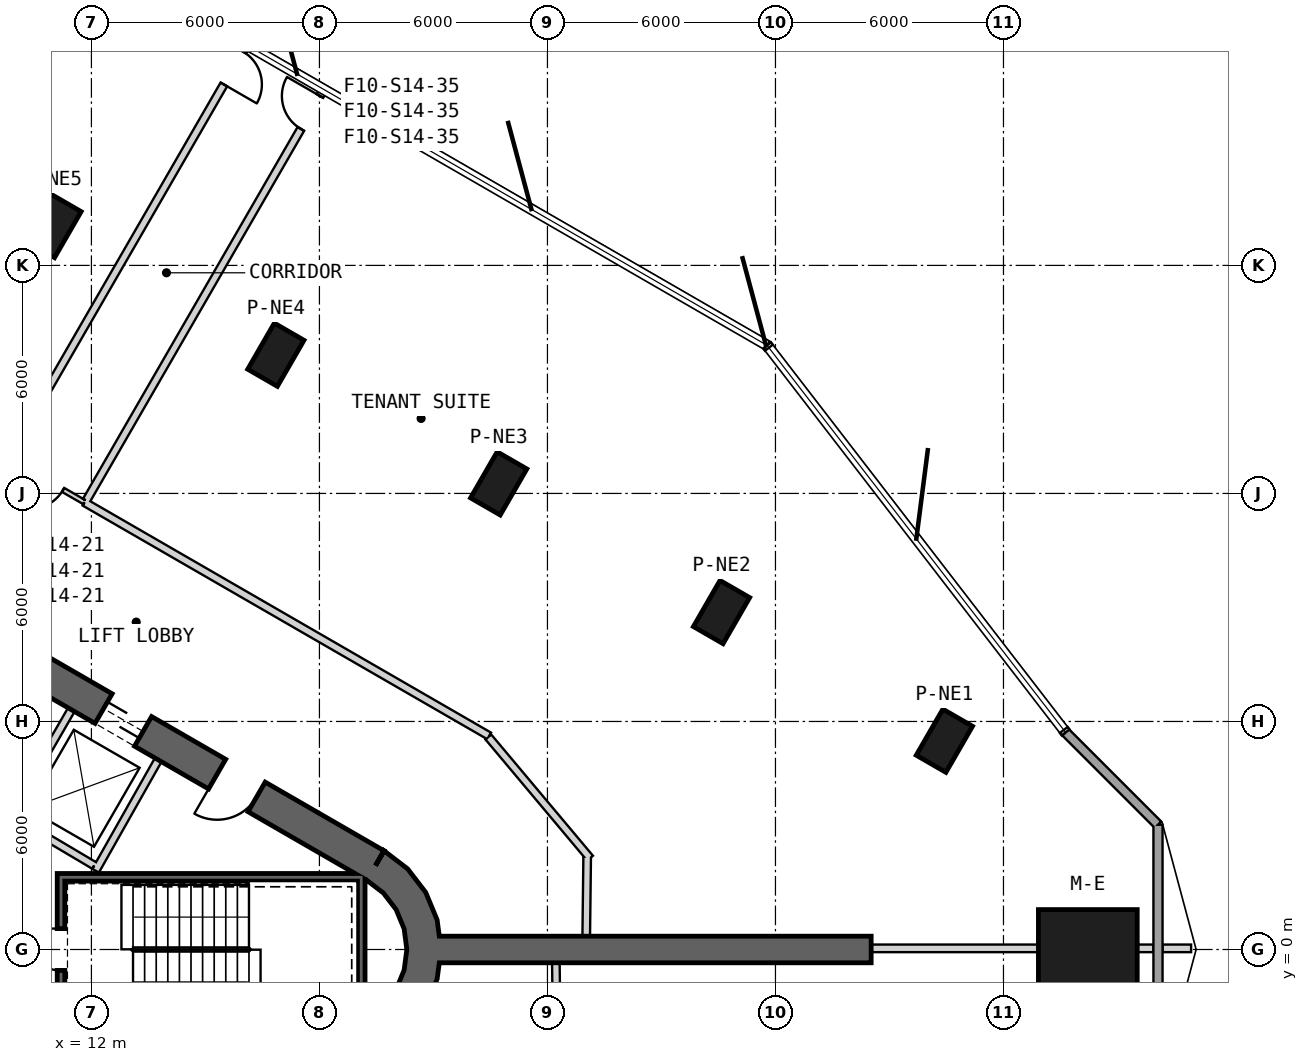
"""IFC4 building model, lengths in metres.
Left out: names, types, materials, properties, quantities, classifications, styles, units other than length and angle.
Written with IfcOpenShell. Run it as: python <this file> out.ifc"""

import sys

from ifc_helpers import new_model, si_unit, direction, frame, frame_2d, origin, origin_2d, place, context, subcontext, project, spatial, polyline, rectangle, outline, extrude, element, fill, save


model = new_model("IFC4")
c1 = context("Model", 3, precision=1e-05, world=origin(), true_north=direction((0.0, 1.0)))
c2 = subcontext(c1, "Body", "Model", "MODEL_VIEW")
j1 = project(units=[si_unit("LENGTHUNIT", "METRE"), si_unit("PLANEANGLEUNIT", "RADIAN")], contexts=[c1])
p1 = place(None, origin())
s1 = spatial("IfcSite", under=j1, at=p1, CompositionType="ELEMENT")
p2 = place(p1, origin())
s2 = spatial("IfcBuilding", under=s1, at=p2, CompositionType="ELEMENT")
p3 = place(p2, frame((0.0, 0.0, 229.2)))
s3 = spatial("IfcBuildingStorey", under=s2, at=p3, CompositionType="ELEMENT", Elevation=229.2)
p4 = place(p3, frame((38.219, 0.0, 0.0), z_axis=(0.0, 0.0, 1.0), x_axis=(1.0, 0.0, 0.0)))
e1 = element("IfcColumn", 1, at=p4, inside=s3, PredefinedType="COLUMN", context=c2, shape_type="SweptSolid", body=[
    extrude(rectangle(XDim=2.6, YDim=2.1, at=origin_2d()), origin(), (0.0, 0.0, 1.0), 4.0),
])
for number, where, z_axis, x_axis in (
    (2, (34.445, 5.493, 0.0), (0.0, 0.0, 1.0), (0.5, 0.866, 0.0)),
    (3, (28.581, 8.878, 0.0), (0.0, 0.0, 1.0), (0.5, 0.866, 0.0)),
    (4, (22.717, 12.264, 0.0), (0.0, 0.0, 1.0), (0.5, 0.866, 0.0)),
    (5, (16.854, 15.649, 0.0), (0.0, 0.0, 1.0), (0.5, 0.866, 0.0)),
    (6, (10.99, 19.035, 0.0), (0.0, 0.0, 1.0), (0.5, 0.866, 0.0)),
):
    element("IfcColumn", number, at=place(p3, frame(where, z_axis=z_axis, x_axis=x_axis)), inside=s3, PredefinedType="COLUMN", context=c2, shape_type="SweptSolid", body=[
        extrude(rectangle(XDim=1.4, YDim=0.9, at=origin_2d()), origin(), (0.0, 0.0, 1.0), 4.0),
    ])
p5 = place(p3, frame((19.475, 2.208, 0.0), z_axis=(0.0, 0.0, 1.0), x_axis=(-0.866028369851, 0.499994862586, 0.0)))
e7 = element("IfcWall", 7, at=p5, inside=s3, PredefinedType="SHEAR", context=c2, shape_type="SweptSolid", body=[
    extrude(rectangle(XDim=31.523, YDim=0.9, at=frame_2d((15.762, 0.0))), origin(), (0.0, 0.0, 1.0), 4.0),
])
p6 = place(p5, frame((7.062, 0.0, 0.0)))
e8 = element("IfcOpeningElement", 8, at=p6, cuts=e7, PredefinedType="OPENING", context=c2, shape_type="SweptSolid", body=[
    extrude(rectangle(XDim=1.2, YDim=2.4, at=frame_2d((0.6, 1.2))), frame((0.0, 0.46, 0.0), z_axis=(0.0, -1.0, 0.0), x_axis=(1.0, 0.0, 0.0)), (0.0, 0.0, 1.0), 0.92),
])
p7 = place(p5, frame((3.612, 0.0, 0.0)))
e9 = element("IfcOpeningElement", 9, at=p7, cuts=e7, PredefinedType="OPENING", context=c2, shape_type="SweptSolid", body=[
    extrude(rectangle(XDim=1.2, YDim=2.4, at=frame_2d((0.6, 1.2))), frame((0.0, 0.46, 0.0), z_axis=(0.0, -1.0, 0.0), x_axis=(1.0, 0.0, 0.0)), (0.0, 0.0, 1.0), 0.92),
])
p8 = place(p5, frame((26.712, 0.0, 0.0)))
e10 = element("IfcOpeningElement", 10, at=p8, cuts=e7, PredefinedType="OPENING", context=c2, shape_type="SweptSolid", body=[
    extrude(rectangle(XDim=1.2, YDim=2.4, at=frame_2d((0.6, 1.2))), frame((0.0, 0.46, 0.0), z_axis=(0.0, -1.0, 0.0), x_axis=(1.0, 0.0, 0.0)), (0.0, 0.0, 1.0), 0.92),
])
p9 = place(p3, origin())
e11 = element("IfcWall", 11, at=p9, inside=s3, PredefinedType="SHEAR", context=c2, shape_type="SweptSolid", body=[
    extrude(outline(polyline([(19.7, -2.598), (20.321, -2.121), (20.798, -1.5), (21.098, -0.777), (21.2, 0.0), (21.098, 0.777), (20.798, 1.5), (20.321, 2.121), (19.7, 2.598), (19.25, 1.819), (19.685, 1.485), (20.019, 1.05), (20.229, 0.543), (20.3, 0.0), (20.229, -0.543), (20.019, -1.05), (19.685, -1.485), (19.25, -1.819), (19.7, -2.598)])), origin(), (0.0, 0.0, 1.0), 4.0),
])
p10 = place(p3, frame((21.15, 0.0, 0.0), z_axis=(0.0, 0.0, 1.0), x_axis=(1.0, 0.0, 0.0)))
e12 = element("IfcWall", 12, at=p10, inside=s3, PredefinedType="SHEAR", context=c2, shape_type="SweptSolid", body=[
    extrude(rectangle(XDim=11.368, YDim=0.7, at=frame_2d((5.684, 0.0))), origin(), (0.0, 0.0, 1.0), 4.0),
])
p11 = place(p3, frame((40.066, -3.282, 0.0), z_axis=(0.0, 0.0, 1.0), x_axis=(0.0, 1.0, 0.0)))
e13 = element("IfcWall", 13, at=p11, inside=s3, PredefinedType="SOLIDWALL", context=c2, shape_type="SweptSolid", body=[
    extrude(rectangle(XDim=6.564, YDim=0.24, at=frame_2d((3.282, 0.0))), origin(), (0.0, 0.0, 1.0), 3.7),
])
p12 = place(p3, frame((40.066, 3.282, 0.0), z_axis=(0.0, 0.0, 1.0), x_axis=(-0.707106781187, 0.707106781187, 0.0)))
e14 = element("IfcWall", 14, at=p12, inside=s3, PredefinedType="SOLIDWALL", context=c2, shape_type="SweptSolid", body=[
    extrude(rectangle(XDim=3.438, YDim=0.24, at=frame_2d((1.719, 0.0))), origin(), (0.0, 0.0, 1.0), 3.7),
])
p13 = place(p3, frame((9.847, 3.495, 0.0), z_axis=(0.0, 0.0, 1.0), x_axis=(0.499984717929, 0.866034226713, 0.0)))
e15 = element("IfcWall", 15, at=p13, inside=s3, PredefinedType="PLUMBINGWALL", context=c2, shape_type="SweptSolid", body=[
    extrude(rectangle(XDim=3.25, YDim=0.2, at=frame_2d((1.625, 0.0))), origin(), (0.0, 0.0, 1.0), 3.7),
])
p14 = place(p3, frame((12.11, 2.073, 0.0), z_axis=(0.0, 0.0, 1.0), x_axis=(0.49196600604, 0.870614408852, 0.0)))
e16 = element("IfcWall", 16, at=p14, inside=s3, PredefinedType="PLUMBINGWALL", context=c2, shape_type="SweptSolid", body=[
    extrude(rectangle(XDim=3.35, YDim=0.2, at=frame_2d((1.675, 0.0))), origin(), (0.0, 0.0, 1.0), 3.7),
])
p15 = place(p3, frame((12.073, 2.211, 0.0), z_axis=(0.0, 0.0, 1.0), x_axis=(-0.860414880418, 0.509594185166, 0.0)))
e17 = element("IfcWall", 17, at=p15, inside=s3, PredefinedType="PLUMBINGWALL", context=c2, shape_type="SweptSolid", body=[
    extrude(rectangle(XDim=2.7, YDim=0.2, at=frame_2d((1.35, 0.0))), origin(), (0.0, 0.0, 1.0), 3.7),
])
p16 = place(p3, frame((19.2, 1.9, -0.3), z_axis=(0.0, 0.0, 1.0), x_axis=(-1.0, 0.0, 0.0)))
e18 = element("IfcWall", 18, at=p16, inside=s3, PredefinedType="SHEAR", context=c2, shape_type="SweptSolid", body=[
    extrude(rectangle(XDim=8.1, YDim=0.2, at=frame_2d((4.05, 0.0))), origin(), (0.0, 0.0, 1.0), 4.0),
])
p17 = place(p3, frame((19.1, -2.0, -0.3), z_axis=(0.0, 0.0, 1.0), x_axis=(0.0, 1.0, 0.0)))
e19 = element("IfcWall", 19, at=p17, inside=s3, PredefinedType="SHEAR", context=c2, shape_type="SweptSolid", body=[
    extrude(rectangle(XDim=3.8, YDim=0.2, at=frame_2d((1.9, 0.0))), origin(), (0.0, 0.0, 1.0), 4.0),
])
p18 = place(p3, frame((11.2, -1.8, -0.3), z_axis=(0.0, 0.0, 1.0), x_axis=(0.0, 1.0, 0.0)))
e20 = element("IfcWall", 20, at=p18, inside=s3, PredefinedType="SHEAR", context=c2, shape_type="SweptSolid", body=[
    extrude(rectangle(XDim=3.6, YDim=0.2, at=frame_2d((1.8, 0.0))), origin(), (0.0, 0.0, 1.0), 4.0),
])
p19 = place(p18, frame((1.25, 0.0, 0.3)))
e21 = element("IfcOpeningElement", 21, at=p19, cuts=e20, PredefinedType="OPENING", context=c2, shape_type="SweptSolid", body=[
    extrude(rectangle(XDim=1.1, YDim=2.1, at=frame_2d((0.55, 1.05))), frame((0.0, 0.11, 0.0), z_axis=(0.0, -1.0, 0.0), x_axis=(1.0, 0.0, 0.0)), (0.0, 0.0, 1.0), 0.22),
])
p20 = place(p3, frame((11.817, 11.768, 0.0), z_axis=(0.0, 0.0, 1.0), x_axis=(-0.86602648383, 0.499998129301, 0.0)))
e22 = element("IfcWall", 22, at=p20, inside=s3, PredefinedType="PARTITIONING", context=c2, shape_type="SweptSolid", body=[
    extrude(rectangle(XDim=2.3, YDim=0.12, at=frame_2d((1.15, 0.0))), origin(), (0.0, 0.0, 1.0), 3.7),
])
p21 = place(p20, frame((0.65, 0.0, 0.0)))
e23 = element("IfcOpeningElement", 23, at=p21, cuts=e22, PredefinedType="OPENING", context=c2, shape_type="SweptSolid", body=[
    extrude(rectangle(XDim=1.0, YDim=2.1, at=frame_2d((0.5, 1.05))), frame((0.0, 0.07, 0.0), z_axis=(0.0, -1.0, 0.0), x_axis=(1.0, 0.0, 0.0)), (0.0, 0.0, 1.0), 0.14),
])
p22 = place(p3, frame((22.466, 5.62, 0.0), z_axis=(0.0, 0.0, 1.0), x_axis=(-0.866024234898, 0.500002024564, 0.0)))
e24 = element("IfcWall", 24, at=p22, inside=s3, PredefinedType="PARTITIONING", context=c2, shape_type="SweptSolid", body=[
    extrude(rectangle(XDim=12.296, YDim=0.2, at=frame_2d((6.148, 0.0))), origin(), (0.0, 0.0, 1.0), 2.88),
])
p23 = place(p3, frame((25.121, 2.403, 0.0), z_axis=(0.0, 0.0, 1.0), x_axis=(-0.642809831665, 0.766025796116, 0.0)))
e25 = element("IfcWall", 25, at=p23, inside=s3, PredefinedType="PARTITIONING", context=c2, shape_type="SweptSolid", body=[
    extrude(rectangle(XDim=4.165, YDim=0.2, at=frame_2d((2.083, 0.0))), origin(), (0.0, 0.0, 1.0), 2.78),
])
p24 = place(p3, frame((25.021, 0.35, 0.0), z_axis=(0.0, 0.0, 1.0), x_axis=(0.012014998271, 0.999927817303, 0.0)))
e26 = element("IfcWall", 26, at=p24, inside=s3, PredefinedType="PARTITIONING", context=c2, shape_type="SweptSolid", body=[
    extrude(rectangle(XDim=2.093, YDim=0.2, at=frame_2d((1.046, 0.0))), origin(), (0.0, 0.0, 1.0), 3.7),
])
p25 = place(p3, frame((24.248, -2.317, 0.0), z_axis=(0.0, 0.0, 1.0), x_axis=(-0.013654841032, 0.999906768312, 0.0)))
e27 = element("IfcWall", 27, at=p25, inside=s3, PredefinedType="PARTITIONING", context=c2, shape_type="SweptSolid", body=[
    extrude(rectangle(XDim=1.967, YDim=0.2, at=frame_2d((0.983, 0.0))), origin(), (0.0, 0.0, 1.0), 3.7),
])
p26 = place(p3, frame((16.086, 23.801, 0.0), z_axis=(0.0, 0.0, 1.0), x_axis=(-0.499993063803, -0.866029408363, 0.0)))
e28 = element("IfcWall", 28, at=p26, inside=s3, PredefinedType="PARTITIONING", context=c2, shape_type="SweptSolid", body=[
    extrude(rectangle(XDim=12.495, YDim=0.2, at=frame_2d((6.248, 0.0))), origin(), (0.0, 0.0, 1.0), 3.7),
])
p27 = place(p26, frame((0.2, 0.0, 0.0)))
e29 = element("IfcOpeningElement", 29, at=p27, cuts=e28, PredefinedType="OPENING", context=c2, shape_type="SweptSolid", body=[
    extrude(rectangle(XDim=1.0, YDim=2.1, at=frame_2d((0.5, 1.05))), frame((0.0, 0.11, 0.0), z_axis=(0.0, -1.0, 0.0), x_axis=(1.0, 0.0, 0.0)), (0.0, 0.0, 1.0), 0.22),
])
p28 = place(p3, frame((11.865, 11.81, 0.0), z_axis=(0.0, 0.0, 1.0), x_axis=(0.500007717682, 0.866020947933, 0.0)))
e30 = element("IfcWall", 30, at=p28, inside=s3, PredefinedType="PARTITIONING", context=c2, shape_type="SweptSolid", body=[
    extrude(rectangle(XDim=12.495, YDim=0.2, at=frame_2d((6.248, 0.0))), origin(), (0.0, 0.0, 1.0), 3.7),
])
p29 = place(p28, frame((11.295, 0.0, 0.0)))
e31 = element("IfcOpeningElement", 31, at=p29, cuts=e30, PredefinedType="OPENING", context=c2, shape_type="SweptSolid", body=[
    extrude(rectangle(XDim=1.0, YDim=2.1, at=frame_2d((0.5, 1.05))), frame((0.0, 0.11, 0.0), z_axis=(0.0, -1.0, 0.0), x_axis=(1.0, 0.0, 0.0)), (0.0, 0.0, 1.0), 0.22),
])
p30 = place(p3, frame((40.937, 0.03, 0.0), z_axis=(0.0, 0.0, 1.0), x_axis=(-1.0, 0.0, 0.0)))
e32 = element("IfcWall", 32, at=p30, inside=s3, PredefinedType="PARTITIONING", context=c2, shape_type="SweptSolid", body=[
    extrude(rectangle(XDim=0.751, YDim=0.2, at=frame_2d((0.376, 0.0))), origin(), (0.0, 0.0, 1.0), 3.7),
])
p31 = place(p3, frame((39.946, 0.03, 0.0), z_axis=(0.0, 0.0, 1.0), x_axis=(-1.0, 0.0, 0.0)))
e33 = element("IfcWall", 33, at=p31, inside=s3, PredefinedType="PARTITIONING", context=c2, shape_type="SweptSolid", body=[
    extrude(rectangle(XDim=0.426, YDim=0.2, at=frame_2d((0.213, 0.0))), origin(), (0.0, 0.0, 1.0), 3.7),
])
p32 = place(p3, frame((36.92, 0.03, 0.0), z_axis=(0.0, 0.0, 1.0), x_axis=(-1.0, 0.0, 0.0)))
e34 = element("IfcWall", 34, at=p32, inside=s3, PredefinedType="PARTITIONING", context=c2, shape_type="SweptSolid", body=[
    extrude(rectangle(XDim=4.402, YDim=0.2, at=frame_2d((2.201, 0.0))), origin(), (0.0, 0.0, 1.0), 3.27),
])
p33 = place(p19, origin())
e35 = element("IfcDoor", 35, at=p33, inside=s3, OperationType="SINGLE_SWING_RIGHT", PredefinedType="USERDEFINED", context=c2, shape_type="SweptSolid", body=[
    extrude(rectangle(XDim=1.1, YDim=2.1, at=frame_2d((0.55, 1.05))), frame((0.0, 0.025, 0.0), z_axis=(0.0, -1.0, 0.0), x_axis=(1.0, 0.0, 0.0)), (0.0, 0.0, 1.0), 0.05),
])
fill(e21, e35)
p34 = place(p21, origin())
e36 = element("IfcDoor", 36, at=p34, inside=s3, OperationType="SINGLE_SWING_RIGHT", PredefinedType="NOTDEFINED", context=c2, shape_type="SweptSolid", body=[
    extrude(rectangle(XDim=1.0, YDim=2.1, at=frame_2d((0.5, 1.05))), frame((0.0, 0.025, 0.0), z_axis=(0.0, -1.0, 0.0), x_axis=(1.0, 0.0, 0.0)), (0.0, 0.0, 1.0), 0.05),
])
fill(e23, e36)
p35 = place(p27, origin())
e37 = element("IfcDoor", 37, at=p35, inside=s3, OperationType="SINGLE_SWING_LEFT", PredefinedType="USERDEFINED", context=c2, shape_type="SweptSolid", body=[
    extrude(rectangle(XDim=1.0, YDim=2.1, at=frame_2d((0.5, 1.05))), frame((0.0, 0.025, 0.0), z_axis=(0.0, -1.0, 0.0), x_axis=(1.0, 0.0, 0.0)), (0.0, 0.0, 1.0), 0.05),
])
fill(e29, e37)
p36 = place(p29, origin())
e38 = element("IfcDoor", 38, at=p36, inside=s3, OperationType="SINGLE_SWING_LEFT", PredefinedType="USERDEFINED", context=c2, shape_type="SweptSolid", body=[
    extrude(rectangle(XDim=1.0, YDim=2.1, at=frame_2d((0.5, 1.05))), frame((0.0, 0.025, 0.0), z_axis=(0.0, -1.0, 0.0), x_axis=(1.0, 0.0, 0.0)), (0.0, 0.0, 1.0), 0.05),
])
fill(e31, e38)
p37 = place(p6, origin())
e39 = element("IfcDoor", 39, at=p37, inside=s3, OperationType="SLIDING_TO_LEFT", PredefinedType="USERDEFINED", context=c2, shape_type="SweptSolid", body=[
    extrude(rectangle(XDim=1.2, YDim=2.4, at=frame_2d((0.6, 1.2))), frame((0.0, 0.025, 0.0), z_axis=(0.0, -1.0, 0.0), x_axis=(1.0, 0.0, 0.0)), (0.0, 0.0, 1.0), 0.05),
])
fill(e8, e39)
p38 = place(p7, origin())
e40 = element("IfcDoor", 40, at=p38, inside=s3, OperationType="SINGLE_SWING_LEFT", PredefinedType="USERDEFINED", context=c2, shape_type="SweptSolid", body=[
    extrude(rectangle(XDim=1.2, YDim=2.4, at=frame_2d((0.6, 1.2))), frame((0.0, 0.025, 0.0), z_axis=(0.0, -1.0, 0.0), x_axis=(1.0, 0.0, 0.0)), (0.0, 0.0, 1.0), 0.05),
])
fill(e9, e40)
save(model, sys.argv[1])
